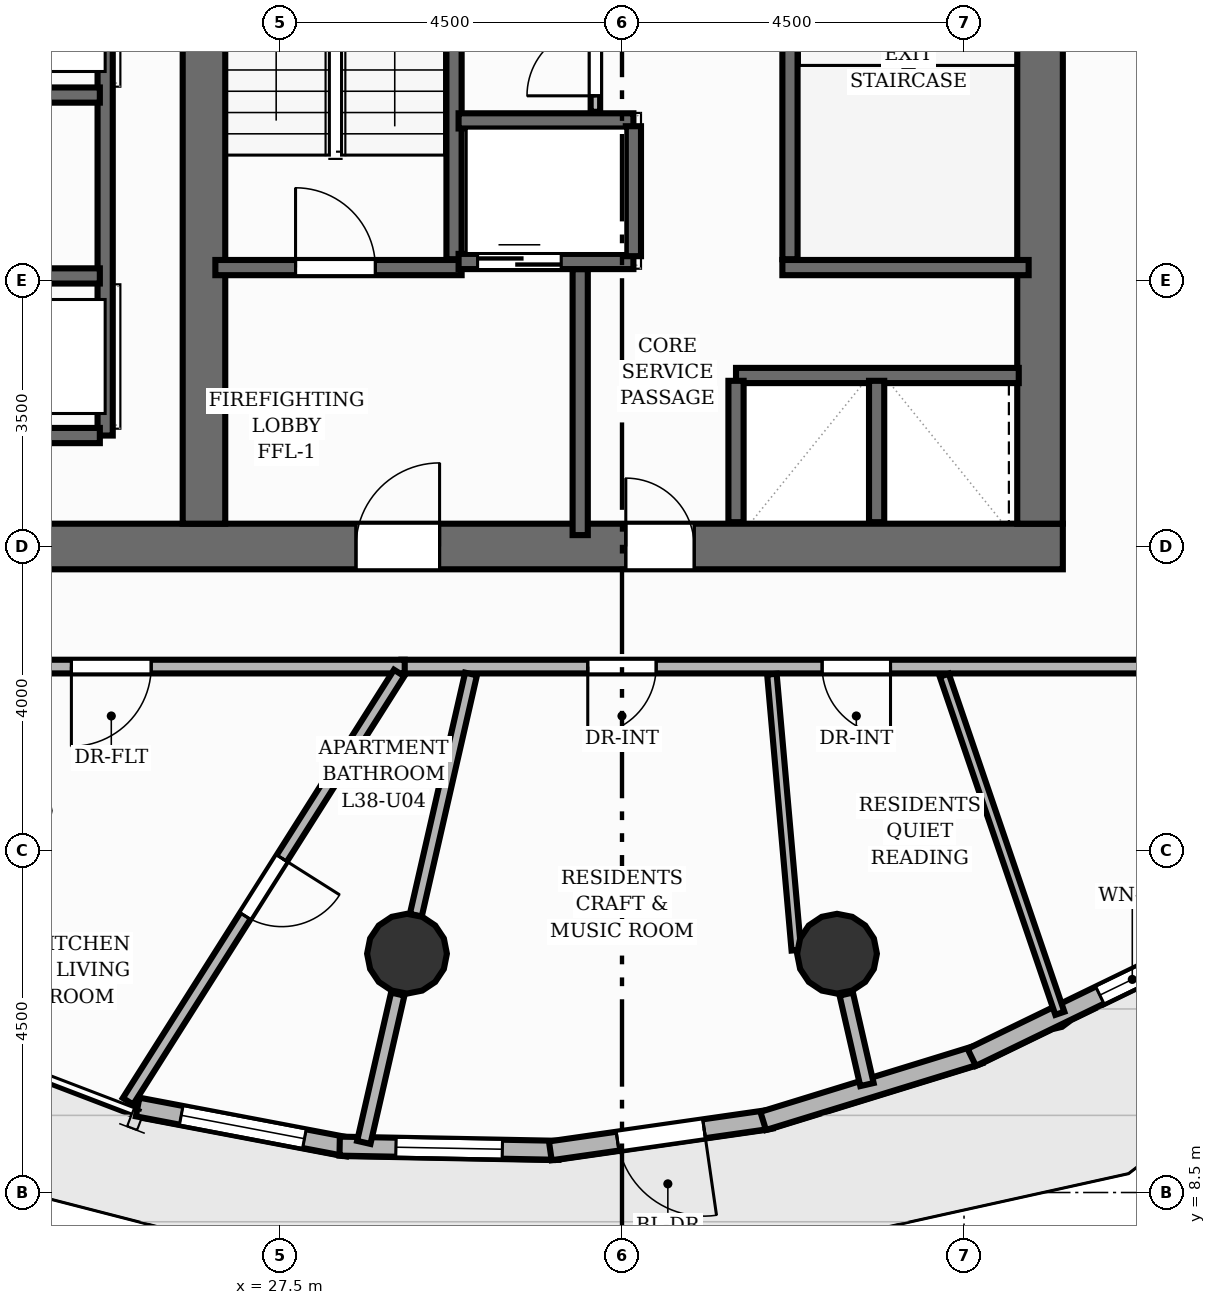
"""IFC4 building model, lengths in metres.
Left out: names, types, materials, properties, quantities, classifications, styles, units other than length and angle.
Written with IfcOpenShell. Run it as: python <this file> out.ifc"""

import sys

from ifc_helpers import new_model, si_unit, direction, frame, frame_2d, origin, origin_2d, place, context, subcontext, project, spatial, rectangle, circle, extrude, element, fill, save


model = new_model("IFC4")
c1 = context("Model", 3, precision=1e-05, world=origin(), true_north=direction((0.0, 1.0)))
c2 = subcontext(c1, "Body", "Model", "MODEL_VIEW")
j1 = project(units=[si_unit("LENGTHUNIT", "METRE"), si_unit("PLANEANGLEUNIT", "RADIAN")], contexts=[c1])
p1 = place(None, origin())
s1 = spatial("IfcSite", under=j1, at=p1, CompositionType="ELEMENT")
p2 = place(p1, origin())
s2 = spatial("IfcBuilding", under=s1, at=p2, CompositionType="ELEMENT")
p3 = place(p2, frame((0.0, 0.0, 129.76)))
s3 = spatial("IfcBuildingStorey", under=s2, at=p3, CompositionType="ELEMENT", Elevation=129.76)
p4 = place(p3, frame((22.7, 17.0, 0.0), z_axis=(0.0, 0.0, 1.0), x_axis=(1.0, 0.0, 0.0)))
e1 = element("IfcWall", 1, at=p4, inside=s3, PredefinedType="SHEAR", context=c2, shape_type="SweptSolid", body=[
    extrude(rectangle(XDim=15.1, YDim=0.6, at=frame_2d((7.55, 0.0))), origin(), (0.0, 0.0, 1.0), 3.2),
])
p5 = place(p4, frame((5.8, 0.0, 0.0)))
e2 = element("IfcOpeningElement", 2, at=p5, cuts=e1, PredefinedType="OPENING", context=c2, shape_type="SweptSolid", body=[
    extrude(rectangle(XDim=1.1, YDim=2.15, at=frame_2d((0.55, 1.075))), frame((0.0, 0.31, 0.0), z_axis=(0.0, -1.0, 0.0), x_axis=(1.0, 0.0, 0.0)), (0.0, 0.0, 1.0), 0.62),
])
p6 = place(p4, frame((9.35, 0.0, 0.0)))
e3 = element("IfcOpeningElement", 3, at=p6, cuts=e1, PredefinedType="OPENING", context=c2, shape_type="SweptSolid", body=[
    extrude(rectangle(XDim=0.9, YDim=2.1, at=frame_2d((0.45, 1.05))), frame((0.0, 0.31, 0.0), z_axis=(0.0, -1.0, 0.0), x_axis=(1.0, 0.0, 0.0)), (0.0, 0.0, 1.0), 0.62),
])
p7 = place(p3, frame((37.5, 17.3, 0.0), z_axis=(0.0, 0.0, 1.0), x_axis=(0.0, 1.0, 0.0)))
e4 = element("IfcWall", 4, at=p7, inside=s3, PredefinedType="SHEAR", context=c2, shape_type="SweptSolid", body=[
    extrude(rectangle(XDim=13.4, YDim=0.6, at=frame_2d((6.7, 0.0))), origin(), (0.0, 0.0, 1.0), 3.2),
])
p8 = place(p3, frame((26.5, 17.3, 0.0), z_axis=(0.0, 0.0, 1.0), x_axis=(0.0, 1.0, 0.0)))
e5 = element("IfcWall", 5, at=p8, inside=s3, PredefinedType="SHEAR", context=c2, shape_type="SweptSolid", body=[
    extrude(rectangle(XDim=13.4, YDim=0.56, at=frame_2d((6.7, 0.0))), origin(), (0.0, 0.0, 1.0), 3.2),
])
for number, where, z_axis, x_axis in (
    (6, (29.171, 11.642, 0.0), (0.0, 0.0, 1.0), (1.0, 0.0, 0.0)),
    (7, (34.829, 11.642, 0.0), (0.0, 0.0, 1.0), (1.0, 0.0, 0.0)),
):
    element("IfcColumn", number, at=place(p3, frame(where, z_axis=z_axis, x_axis=x_axis)), inside=s3, PredefinedType="COLUMN", context=c2, shape_type="SweptSolid", body=[
        extrude(circle(Radius=0.525, at=origin_2d()), origin(), (0.0, 0.0, 1.0), 3.2),
    ])
p9 = place(p3, frame((28.396, 9.099, 0.0), z_axis=(0.0, 0.0, 1.0), x_axis=(-0.982412055756, 0.18672587583, 0.0)))
e8 = element("IfcWall", 8, at=p9, inside=s3, PredefinedType="SOLIDWALL", context=c2, shape_type="SweptSolid", body=[
    extrude(rectangle(XDim=2.818, YDim=0.25, at=frame_2d((1.409, 0.0))), origin(), (0.0, 0.0, 1.0), 2.96),
])
p10 = place(p9, frame((0.584, 0.0, 0.85)))
e9 = element("IfcOpeningElement", 9, at=p10, cuts=e8, PredefinedType="OPENING", context=c2, shape_type="SweptSolid", body=[
    extrude(rectangle(XDim=1.65, YDim=1.55, at=frame_2d((0.825, 0.775))), frame((0.0, 0.135, 0.0), z_axis=(0.0, -1.0, 0.0), x_axis=(1.0, 0.0, 0.0)), (0.0, 0.0, 1.0), 0.27),
])
p11 = place(p3, frame((31.167, 9.055, 0.0), z_axis=(0.0, 0.0, 1.0), x_axis=(-0.99981990109, 0.018978023714, 0.0)))
e10 = element("IfcWall", 10, at=p11, inside=s3, PredefinedType="SOLIDWALL", context=c2, shape_type="SweptSolid", body=[
    extrude(rectangle(XDim=2.882, YDim=0.25, at=frame_2d((1.441, 0.0))), origin(), (0.0, 0.0, 1.0), 2.96),
])
p12 = place(p11, frame((0.741, 0.0, 0.85)))
e11 = element("IfcOpeningElement", 11, at=p12, cuts=e10, PredefinedType="OPENING", context=c2, shape_type="SweptSolid", body=[
    extrude(rectangle(XDim=1.4, YDim=1.55, at=frame_2d((0.7, 0.775))), frame((0.0, 0.135, 0.0), z_axis=(0.0, -1.0, 0.0), x_axis=(1.0, 0.0, 0.0)), (0.0, 0.0, 1.0), 0.27),
])
p13 = place(p3, frame((33.964, 9.466, 0.0), z_axis=(0.0, 0.0, 1.0), x_axis=(-0.989856170947, -0.142073082737, 0.0)))
e12 = element("IfcWall", 12, at=p13, inside=s3, PredefinedType="SOLIDWALL", context=c2, shape_type="SweptSolid", body=[
    extrude(rectangle(XDim=2.937, YDim=0.25, at=frame_2d((1.468, 0.0))), origin(), (0.0, 0.0, 1.0), 2.96),
])
p14 = place(p13, frame((0.893, 0.0, 0.0)))
e13 = element("IfcOpeningElement", 13, at=p14, cuts=e12, PredefinedType="OPENING", context=c2, shape_type="SweptSolid", body=[
    extrude(rectangle(XDim=1.15, YDim=2.2, at=frame_2d((0.575, 1.1))), frame((0.0, 0.135, 0.0), z_axis=(0.0, -1.0, 0.0), x_axis=(1.0, 0.0, 0.0)), (0.0, 0.0, 1.0), 0.27),
])
p15 = place(p3, frame((36.702, 10.319, 0.0), z_axis=(0.0, 0.0, 1.0), x_axis=(-0.955653025963, -0.294494981227, 0.0)))
e14 = element("IfcWall", 14, at=p15, inside=s3, PredefinedType="SOLIDWALL", context=c2, shape_type="SweptSolid", body=[
    extrude(rectangle(XDim=2.977, YDim=0.25, at=frame_2d((1.489, 0.0))), origin(), (0.0, 0.0, 1.0), 2.96),
])
p16 = place(p3, frame((39.299, 11.588, 0.0), z_axis=(0.0, 0.0, 1.0), x_axis=(-0.899657133161, -0.436597117206, 0.0)))
e15 = element("IfcWall", 15, at=p16, inside=s3, PredefinedType="SOLIDWALL", context=c2, shape_type="SweptSolid", body=[
    extrude(rectangle(XDim=2.998, YDim=0.25, at=frame_2d((1.499, 0.0))), origin(), (0.0, 0.0, 1.0), 2.96),
])
p17 = place(p16, frame((0.175, 0.0, 0.85)))
e16 = element("IfcOpeningElement", 16, at=p17, cuts=e15, PredefinedType="OPENING", context=c2, shape_type="SweptSolid", body=[
    extrude(rectangle(XDim=0.95, YDim=1.45, at=frame_2d((0.475, 0.725))), frame((0.0, 0.135, 0.0), z_axis=(0.0, -1.0, 0.0), x_axis=(1.0, 0.0, 0.0)), (0.0, 0.0, 1.0), 0.27),
])
p18 = place(p3, frame((29.79, 20.78, 0.0), z_axis=(0.0, 0.0, 1.0), x_axis=(0.0, 1.0, 0.0)))
e17 = element("IfcWall", 17, at=p18, inside=s3, PredefinedType="SHEAR", context=c2, shape_type="SweptSolid", body=[
    extrude(rectangle(XDim=6.44, YDim=0.2, at=frame_2d((3.22, 0.0))), origin(), (0.0, 0.0, 1.0), 3.2),
])
p19 = place(p3, frame((26.65, 20.67, 0.0), z_axis=(0.0, 0.0, 1.0), x_axis=(1.0, 0.0, 0.0)))
e18 = element("IfcWall", 18, at=p19, inside=s3, PredefinedType="SHEAR", context=c2, shape_type="SweptSolid", body=[
    extrude(rectangle(XDim=3.24, YDim=0.2, at=frame_2d((1.62, 0.0))), origin(), (0.0, 0.0, 1.0), 3.2),
])
p20 = place(p19, frame((1.055, 0.0, 0.0)))
e19 = element("IfcOpeningElement", 19, at=p20, cuts=e18, PredefinedType="OPENING", context=c2, shape_type="SweptSolid", body=[
    extrude(rectangle(XDim=1.05, YDim=2.15, at=frame_2d((0.525, 1.075))), frame((0.0, 0.11, 0.0), z_axis=(0.0, -1.0, 0.0), x_axis=(1.0, 0.0, 0.0)), (0.0, 0.0, 1.0), 0.22),
])
p21 = place(p3, frame((34.21, 20.78, 0.0), z_axis=(0.0, 0.0, 1.0), x_axis=(0.0, 1.0, 0.0)))
e20 = element("IfcWall", 20, at=p21, inside=s3, PredefinedType="SHEAR", context=c2, shape_type="SweptSolid", body=[
    extrude(rectangle(XDim=6.44, YDim=0.2, at=frame_2d((3.22, 0.0))), origin(), (0.0, 0.0, 1.0), 3.2),
])
p22 = place(p3, frame((34.11, 20.67, 0.0), z_axis=(0.0, 0.0, 1.0), x_axis=(1.0, 0.0, 0.0)))
e21 = element("IfcWall", 21, at=p22, inside=s3, PredefinedType="SHEAR", context=c2, shape_type="SweptSolid", body=[
    extrude(rectangle(XDim=3.24, YDim=0.2, at=frame_2d((1.62, 0.0))), origin(), (0.0, 0.0, 1.0), 3.2),
])
p23 = place(p3, frame((31.45, 17.15, 0.0), z_axis=(0.0, 0.0, 1.0), x_axis=(0.0, 1.0, 0.0)))
e22 = element("IfcWall", 22, at=p23, inside=s3, PredefinedType="SHEAR", context=c2, shape_type="SweptSolid", body=[
    extrude(rectangle(XDim=3.5, YDim=0.2, at=frame_2d((1.75, 0.0))), origin(), (0.0, 0.0, 1.0), 3.2),
])
p24 = place(p3, frame((29.85, 20.75, 0.0), z_axis=(0.0, 0.0, 1.0), x_axis=(1.0, 0.0, 0.0)))
e23 = element("IfcWall", 23, at=p24, inside=s3, PredefinedType="SHEAR", context=c2, shape_type="SweptSolid", body=[
    extrude(rectangle(XDim=2.3, YDim=0.2, at=frame_2d((1.15, 0.0))), origin(), (0.0, 0.0, 1.0), 3.2),
])
p25 = place(p24, frame((0.25, 0.0, 0.0)))
e24 = element("IfcOpeningElement", 24, at=p25, cuts=e23, PredefinedType="OPENING", context=c2, shape_type="SweptSolid", body=[
    extrude(rectangle(XDim=1.1, YDim=2.15, at=frame_2d((0.55, 1.075))), frame((0.0, 0.11, 0.0), z_axis=(0.0, -1.0, 0.0), x_axis=(1.0, 0.0, 0.0)), (0.0, 0.0, 1.0), 0.22),
])
p26 = place(p3, frame((29.85, 22.6, 0.0), z_axis=(0.0, 0.0, 1.0), x_axis=(1.0, 0.0, 0.0)))
e25 = element("IfcWall", 25, at=p26, inside=s3, PredefinedType="SHEAR", context=c2, shape_type="SweptSolid", body=[
    extrude(rectangle(XDim=2.3, YDim=0.2, at=frame_2d((1.15, 0.0))), origin(), (0.0, 0.0, 1.0), 3.2),
])
p27 = place(p3, frame((32.15, 20.82, 0.0), z_axis=(0.0, 0.0, 1.0), x_axis=(0.0, 1.0, 0.0)))
e26 = element("IfcWall", 26, at=p27, inside=s3, PredefinedType="SHEAR", context=c2, shape_type="SweptSolid", body=[
    extrude(rectangle(XDim=1.71, YDim=0.2, at=frame_2d((0.855, 0.0))), origin(), (0.0, 0.0, 1.0), 3.2),
])
p28 = place(p3, frame((25.2, 18.46, 0.0), z_axis=(0.0, 0.0, 1.0), x_axis=(0.0, 1.0, 0.0)))
e27 = element("IfcWall", 27, at=p28, inside=s3, PredefinedType="SHEAR", context=c2, shape_type="SweptSolid", body=[
    extrude(rectangle(XDim=11.08, YDim=0.2, at=frame_2d((5.54, 0.0))), origin(), (0.0, 0.0, 1.0), 3.2),
])
for number, where, z_axis, x_axis in (
    (28, (23.42, 18.46, 0.0), (0.0, 0.0, 1.0), (1.0, 0.0, 0.0)),
    (29, (23.42, 20.56, 0.0), (0.0, 0.0, 1.0), (1.0, 0.0, 0.0)),
    (30, (23.42, 22.94, 0.0), (0.0, 0.0, 1.0), (1.0, 0.0, 0.0)),
):
    element("IfcWall", number, at=place(p3, frame(where, z_axis=z_axis, x_axis=x_axis)), inside=s3, PredefinedType="SHEAR", context=c2, shape_type="SweptSolid", body=[
        extrude(rectangle(XDim=1.71, YDim=0.2, at=frame_2d((0.855, 0.0))), origin(), (0.0, 0.0, 1.0), 3.2),
    ])
p29 = place(p3, frame((33.5, 19.25, 0.0), z_axis=(0.0, 0.0, 1.0), x_axis=(1.0, 0.0, 0.0)))
e31 = element("IfcWall", 31, at=p29, inside=s3, PredefinedType="SHEAR", context=c2, shape_type="SweptSolid", body=[
    extrude(rectangle(XDim=3.72, YDim=0.2, at=frame_2d((1.86, 0.0))), origin(), (0.0, 0.0, 1.0), 3.2),
])
for number, where, z_axis, x_axis in (
    (32, (33.5, 17.32, 0.0), (0.0, 0.0, 1.0), (0.0, 1.0, 0.0)),
    (33, (35.35, 17.32, 0.0), (0.0, 0.0, 1.0), (0.0, 1.0, 0.0)),
):
    element("IfcWall", number, at=place(p3, frame(where, z_axis=z_axis, x_axis=x_axis)), inside=s3, PredefinedType="SHEAR", context=c2, shape_type="SweptSolid", body=[
        extrude(rectangle(XDim=1.86, YDim=0.2, at=frame_2d((0.93, 0.0))), origin(), (0.0, 0.0, 1.0), 3.2),
    ])
p30 = place(p3, frame((31.65, 22.72, 0.0), z_axis=(0.0, 0.0, 1.0), x_axis=(0.0, 1.0, 0.0)))
e34 = element("IfcWall", 34, at=p30, inside=s3, PredefinedType="PARTITIONING", context=c2, shape_type="SweptSolid", body=[
    extrude(rectangle(XDim=2.52, YDim=0.125, at=frame_2d((1.26, 0.0))), origin(), (0.0, 0.0, 1.0), 2.955),
])
p31 = place(p30, frame((0.21, 0.0, 0.0)))
e35 = element("IfcOpeningElement", 35, at=p31, cuts=e34, PredefinedType="OPENING", context=c2, shape_type="SweptSolid", body=[
    extrude(rectangle(XDim=0.9, YDim=2.1, at=frame_2d((0.45, 1.05))), frame((0.0, 0.073, 0.0), z_axis=(0.0, -1.0, 0.0), x_axis=(1.0, 0.0, 0.0)), (0.0, 0.0, 1.0), 0.145),
])
p32 = place(p3, frame((29.05, 11.111, 0.0), z_axis=(0.0, 0.0, 1.0), x_axis=(-0.2231492674, -0.974784286116, 0.0)))
e36 = element("IfcWall", 36, at=p32, inside=s3, PredefinedType="PARTITIONING", context=c2, shape_type="SweptSolid", body=[
    extrude(rectangle(XDim=2.002, YDim=0.18, at=frame_2d((1.001, 0.0))), origin(), (0.0, 0.0, 1.0), 2.336),
])
p33 = place(p3, frame((34.95, 11.111, 0.0), z_axis=(0.0, 0.0, 1.0), x_axis=(0.223107064029, -0.974793946422, 0.0)))
e37 = element("IfcWall", 37, at=p33, inside=s3, PredefinedType="PARTITIONING", context=c2, shape_type="SweptSolid", body=[
    extrude(rectangle(XDim=1.221, YDim=0.18, at=frame_2d((0.611, 0.0))), origin(), (0.0, 0.0, 1.0), 2.336),
])
p34 = place(p3, frame((39.02, 15.42, 0.0), z_axis=(0.0, 0.0, 1.0), x_axis=(-1.0, 0.0, 0.0)))
e38 = element("IfcWall", 38, at=p34, inside=s3, PredefinedType="PARTITIONING", context=c2, shape_type="SweptSolid", body=[
    extrude(rectangle(XDim=9.922, YDim=0.18, at=frame_2d((4.961, 0.0))), origin(), (0.0, 0.0, 1.0), 2.955),
])
p35 = place(p34, frame((3.487, 0.0, 0.0)))
e39 = element("IfcOpeningElement", 39, at=p35, cuts=e38, PredefinedType="OPENING", context=c2, shape_type="SweptSolid", body=[
    extrude(rectangle(XDim=0.9, YDim=2.1, at=frame_2d((0.45, 1.05))), frame((0.0, 0.1, 0.0), z_axis=(0.0, -1.0, 0.0), x_axis=(1.0, 0.0, 0.0)), (0.0, 0.0, 1.0), 0.2),
])
p36 = place(p34, frame((6.571, 0.0, 0.0)))
e40 = element("IfcOpeningElement", 40, at=p36, cuts=e38, PredefinedType="OPENING", context=c2, shape_type="SweptSolid", body=[
    extrude(rectangle(XDim=0.9, YDim=2.1, at=frame_2d((0.45, 1.05))), frame((0.0, 0.1, 0.0), z_axis=(0.0, -1.0, 0.0), x_axis=(1.0, 0.0, 0.0)), (0.0, 0.0, 1.0), 0.2),
])
p37 = place(p3, frame((29.141, 15.42, 0.0), z_axis=(0.0, 0.0, 1.0), x_axis=(-1.0, 0.0, 0.0)))
e41 = element("IfcWall", 41, at=p37, inside=s3, PredefinedType="PARTITIONING", context=c2, shape_type="SweptSolid", body=[
    extrude(rectangle(XDim=7.721, YDim=0.18, at=frame_2d((3.861, 0.0))), origin(), (0.0, 0.0, 1.0), 2.955),
])
p38 = place(p37, frame((3.336, 0.0, 0.0)))
e42 = element("IfcOpeningElement", 42, at=p38, cuts=e41, PredefinedType="OPENING", context=c2, shape_type="SweptSolid", body=[
    extrude(rectangle(XDim=1.05, YDim=2.15, at=frame_2d((0.525, 1.075))), frame((0.0, 0.1, 0.0), z_axis=(0.0, -1.0, 0.0), x_axis=(1.0, 0.0, 0.0)), (0.0, 0.0, 1.0), 0.2),
])
p39 = place(p3, frame((37.76, 10.858, 0.0), z_axis=(0.0, 0.0, 1.0), x_axis=(-0.323447862149, 0.946245993635, 0.0)))
e43 = element("IfcWall", 43, at=p39, inside=s3, PredefinedType="PARTITIONING", context=c2, shape_type="SweptSolid", body=[
    extrude(rectangle(XDim=4.701, YDim=0.125, at=frame_2d((2.351, 0.0))), origin(), (0.0, 0.0, 1.0), 2.955),
])
p40 = place(p3, frame((34.293, 11.689, 0.0), z_axis=(0.0, 0.0, 1.0), x_axis=(-0.088065804539, 0.996114659098, 0.0)))
e44 = element("IfcWall", 44, at=p40, inside=s3, PredefinedType="PARTITIONING", context=c2, shape_type="SweptSolid", body=[
    extrude(rectangle(XDim=3.646, YDim=0.125, at=frame_2d((1.823, 0.0))), origin(), (0.0, 0.0, 1.0), 2.336),
])
p41 = place(p3, frame((29.287, 12.149, 0.0), z_axis=(0.0, 0.0, 1.0), x_axis=(0.223166862669, 0.97478025801, 0.0)))
e45 = element("IfcWall", 45, at=p41, inside=s3, PredefinedType="PLUMBINGWALL", context=c2, shape_type="SweptSolid", body=[
    extrude(rectangle(XDim=3.256, YDim=0.16, at=frame_2d((1.628, 0.0))), origin(), (0.0, 0.0, 1.0), 2.336),
])
p42 = place(p3, frame((29.068, 15.335, 0.0), z_axis=(0.0, 0.0, 1.0), x_axis=(-0.534879638081, -0.844928264864, 0.0)))
e46 = element("IfcWall", 46, at=p42, inside=s3, PredefinedType="PLUMBINGWALL", context=c2, shape_type="SweptSolid", body=[
    extrude(rectangle(XDim=6.669, YDim=0.16, at=frame_2d((3.335, 0.0))), origin(), (0.0, 0.0, 1.0), 2.692),
])
p43 = place(p42, frame((2.885, 0.0, 0.0)))
e47 = element("IfcOpeningElement", 47, at=p43, cuts=e46, PredefinedType="OPENING", context=c2, shape_type="SweptSolid", body=[
    extrude(rectangle(XDim=0.9, YDim=2.1, at=frame_2d((0.45, 1.05))), frame((0.0, 0.09, 0.0), z_axis=(0.0, -1.0, 0.0), x_axis=(1.0, 0.0, 0.0)), (0.0, 0.0, 1.0), 0.18),
])
p44 = place(p14, origin())
e48 = element("IfcDoor", 48, at=p44, inside=s3, OperationType="SINGLE_SWING_LEFT", PredefinedType="DOOR", context=c2, shape_type="SweptSolid", body=[
    extrude(rectangle(XDim=1.15, YDim=2.2, at=frame_2d((0.575, 1.1))), frame((0.0, 0.025, 0.0), z_axis=(0.0, -1.0, 0.0), x_axis=(1.0, 0.0, 0.0)), (0.0, 0.0, 1.0), 0.05),
])
fill(e13, e48)
p45 = place(p10, origin())
e49 = element("IfcWindow", 49, at=p45, inside=s3, PartitioningType="SINGLE_PANEL", PredefinedType="WINDOW", context=c2, shape_type="SweptSolid", body=[
    extrude(rectangle(XDim=1.65, YDim=1.55, at=frame_2d((0.825, 0.775))), frame((0.0, 0.03, 0.0), z_axis=(0.0, -1.0, 0.0), x_axis=(1.0, 0.0, 0.0)), (0.0, 0.0, 1.0), 0.06),
])
fill(e9, e49)
p46 = place(p12, origin())
e50 = element("IfcWindow", 50, at=p46, inside=s3, PartitioningType="SINGLE_PANEL", PredefinedType="WINDOW", context=c2, shape_type="SweptSolid", body=[
    extrude(rectangle(XDim=1.4, YDim=1.55, at=frame_2d((0.7, 0.775))), frame((0.0, 0.03, 0.0), z_axis=(0.0, -1.0, 0.0), x_axis=(1.0, 0.0, 0.0)), (0.0, 0.0, 1.0), 0.06),
])
fill(e11, e50)
p47 = place(p17, origin())
e51 = element("IfcWindow", 51, at=p47, inside=s3, PartitioningType="SINGLE_PANEL", PredefinedType="WINDOW", context=c2, shape_type="SweptSolid", body=[
    extrude(rectangle(XDim=0.95, YDim=1.45, at=frame_2d((0.475, 0.725))), frame((0.0, 0.03, 0.0), z_axis=(0.0, -1.0, 0.0), x_axis=(1.0, 0.0, 0.0)), (0.0, 0.0, 1.0), 0.06),
])
fill(e16, e51)
p48 = place(p20, origin())
e52 = element("IfcDoor", 52, at=p48, inside=s3, OperationType="SINGLE_SWING_LEFT", PredefinedType="DOOR", context=c2, shape_type="SweptSolid", body=[
    extrude(rectangle(XDim=1.05, YDim=2.15, at=frame_2d((0.525, 1.075))), frame((0.0, 0.025, 0.0), z_axis=(0.0, -1.0, 0.0), x_axis=(1.0, 0.0, 0.0)), (0.0, 0.0, 1.0), 0.05),
])
fill(e19, e52)
p49 = place(p5, origin())
e53 = element("IfcDoor", 53, at=p49, inside=s3, OperationType="SINGLE_SWING_RIGHT", PredefinedType="DOOR", context=c2, shape_type="SweptSolid", body=[
    extrude(rectangle(XDim=1.1, YDim=2.15, at=frame_2d((0.55, 1.075))), frame((0.0, 0.025, 0.0), z_axis=(0.0, -1.0, 0.0), x_axis=(1.0, 0.0, 0.0)), (0.0, 0.0, 1.0), 0.05),
])
fill(e2, e53)
p50 = place(p25, origin())
e54 = element("IfcDoor", 54, at=p50, inside=s3, OperationType="DOUBLE_DOOR_SLIDING", PredefinedType="DOOR", context=c2, shape_type="SweptSolid", body=[
    extrude(rectangle(XDim=1.1, YDim=2.15, at=frame_2d((0.55, 1.075))), frame((0.0, 0.025, 0.0), z_axis=(0.0, -1.0, 0.0), x_axis=(1.0, 0.0, 0.0)), (0.0, 0.0, 1.0), 0.05),
])
fill(e24, e54)
p51 = place(p6, origin())
e55 = element("IfcDoor", 55, at=p51, inside=s3, OperationType="SINGLE_SWING_LEFT", PredefinedType="DOOR", context=c2, shape_type="SweptSolid", body=[
    extrude(rectangle(XDim=0.9, YDim=2.1, at=frame_2d((0.45, 1.05))), frame((0.0, 0.025, 0.0), z_axis=(0.0, -1.0, 0.0), x_axis=(1.0, 0.0, 0.0)), (0.0, 0.0, 1.0), 0.05),
])
fill(e3, e55)
p52 = place(p31, origin())
e56 = element("IfcDoor", 56, at=p52, inside=s3, OperationType="SINGLE_SWING_LEFT", PredefinedType="DOOR", context=c2, shape_type="SweptSolid", body=[
    extrude(rectangle(XDim=0.9, YDim=2.1, at=frame_2d((0.45, 1.05))), frame((0.0, 0.025, 0.0), z_axis=(0.0, -1.0, 0.0), x_axis=(1.0, 0.0, 0.0)), (0.0, 0.0, 1.0), 0.05),
])
fill(e35, e56)
p53 = place(p35, origin())
e57 = element("IfcDoor", 57, at=p53, inside=s3, OperationType="SINGLE_SWING_LEFT", PredefinedType="DOOR", context=c2, shape_type="SweptSolid", body=[
    extrude(rectangle(XDim=0.9, YDim=2.1, at=frame_2d((0.45, 1.05))), frame((0.0, 0.025, 0.0), z_axis=(0.0, -1.0, 0.0), x_axis=(1.0, 0.0, 0.0)), (0.0, 0.0, 1.0), 0.05),
])
fill(e39, e57)
p54 = place(p36, origin())
e58 = element("IfcDoor", 58, at=p54, inside=s3, OperationType="SINGLE_SWING_RIGHT", PredefinedType="DOOR", context=c2, shape_type="SweptSolid", body=[
    extrude(rectangle(XDim=0.9, YDim=2.1, at=frame_2d((0.45, 1.05))), frame((0.0, 0.025, 0.0), z_axis=(0.0, -1.0, 0.0), x_axis=(1.0, 0.0, 0.0)), (0.0, 0.0, 1.0), 0.05),
])
fill(e40, e58)
p55 = place(p38, origin())
e59 = element("IfcDoor", 59, at=p55, inside=s3, OperationType="SINGLE_SWING_RIGHT", PredefinedType="DOOR", context=c2, shape_type="SweptSolid", body=[
    extrude(rectangle(XDim=1.05, YDim=2.15, at=frame_2d((0.525, 1.075))), frame((0.0, 0.025, 0.0), z_axis=(0.0, -1.0, 0.0), x_axis=(1.0, 0.0, 0.0)), (0.0, 0.0, 1.0), 0.05),
])
fill(e42, e59)
p56 = place(p43, origin())
e60 = element("IfcDoor", 60, at=p56, inside=s3, OperationType="SINGLE_SWING_LEFT", PredefinedType="DOOR", context=c2, shape_type="SweptSolid", body=[
    extrude(rectangle(XDim=0.9, YDim=2.1, at=frame_2d((0.45, 1.05))), frame((0.0, 0.025, 0.0), z_axis=(0.0, -1.0, 0.0), x_axis=(1.0, 0.0, 0.0)), (0.0, 0.0, 1.0), 0.05),
])
fill(e47, e60)
save(model, sys.argv[1])
